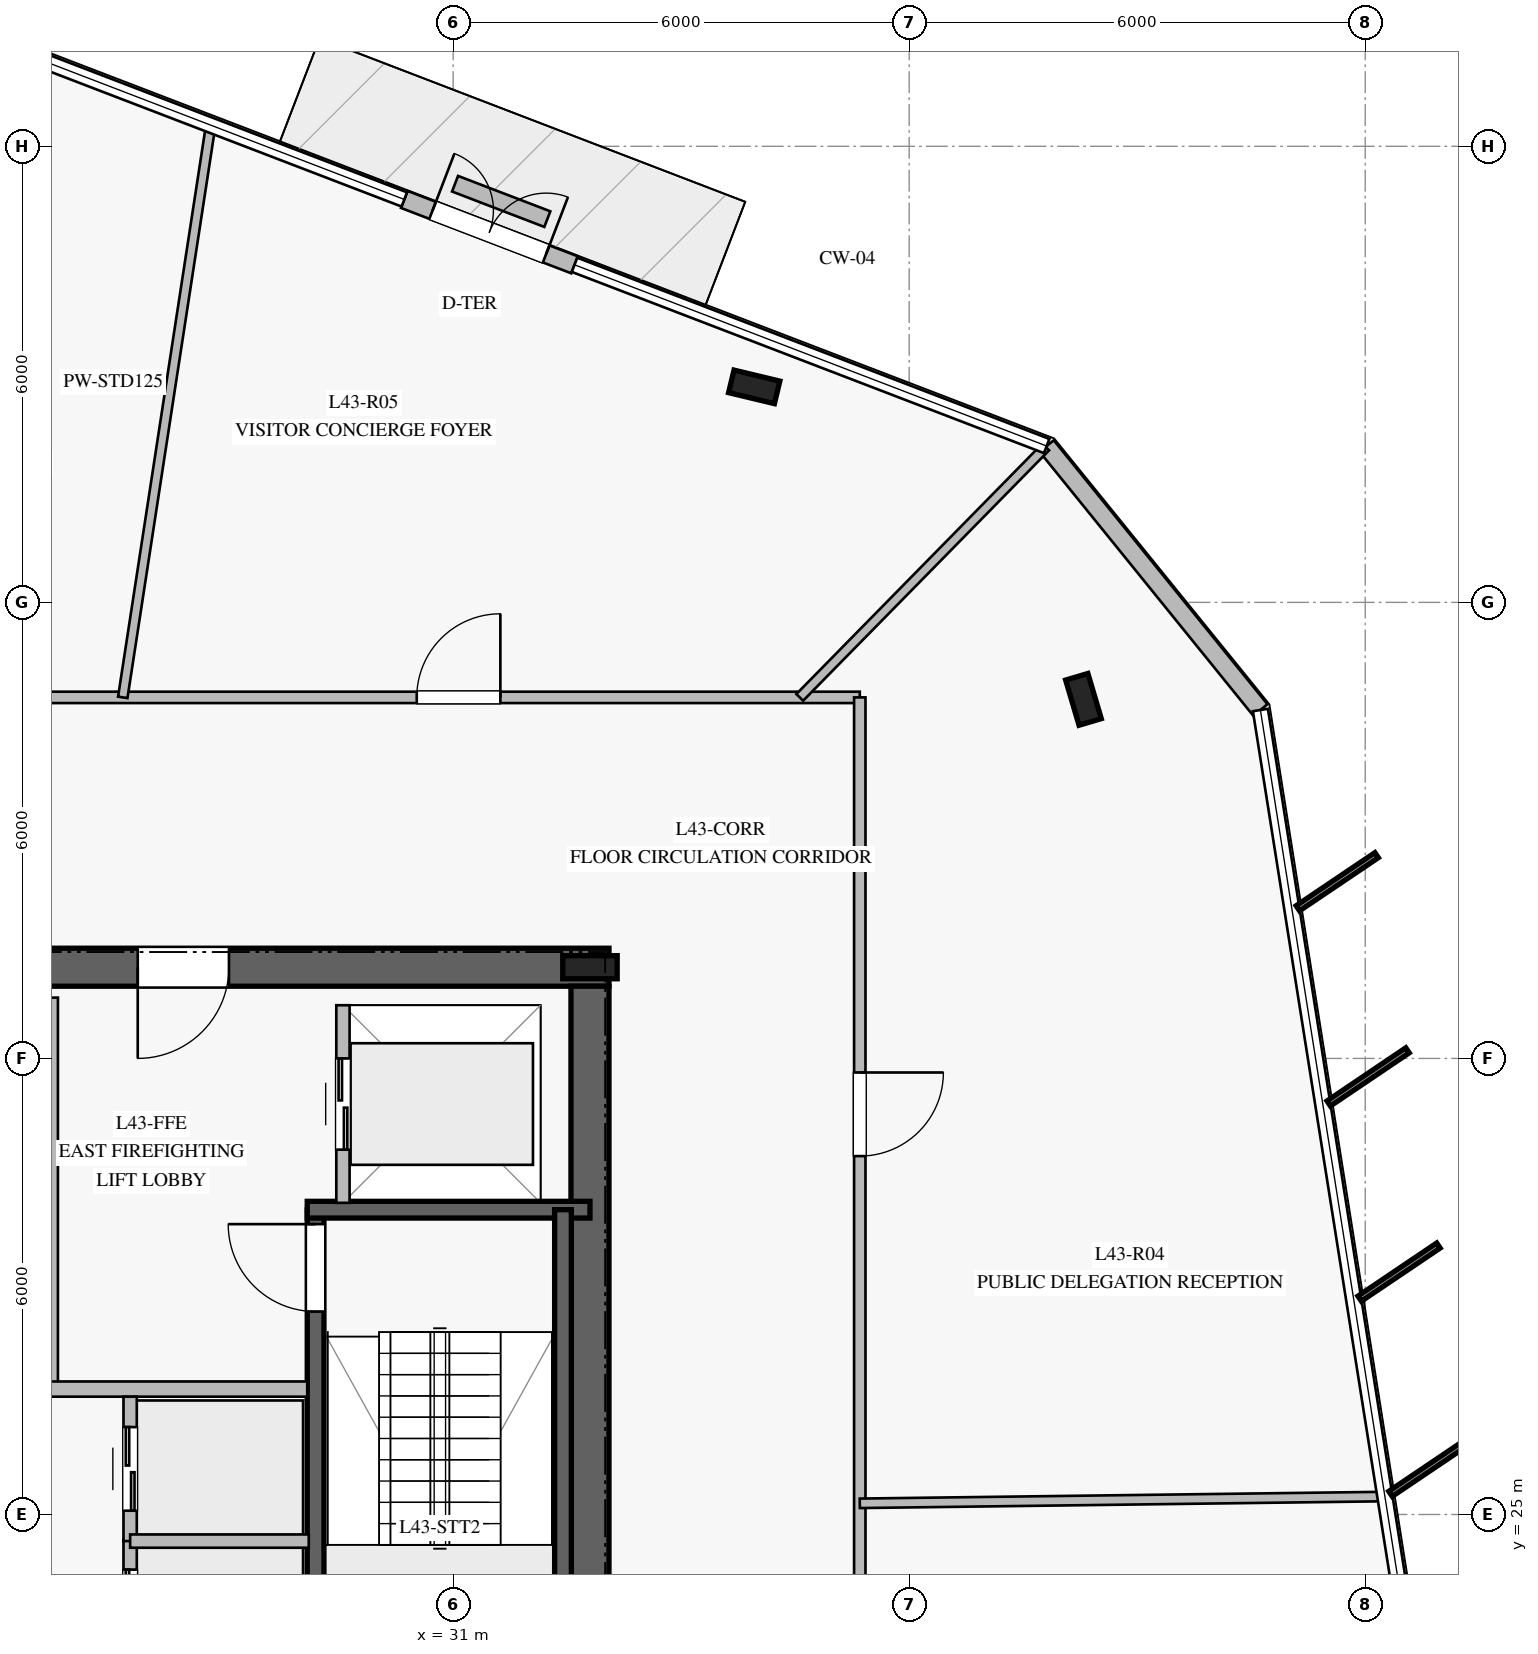
"""IFC4 building model, lengths in metres.
Left out: names, types, materials, properties, quantities, classifications, styles, units other than length and angle.
Written with IfcOpenShell. Run it as: python <this file> out.ifc"""

import sys

from ifc_helpers import new_model, si_unit, direction, frame, frame_2d, origin, origin_2d, place, context, subcontext, project, spatial, rectangle, i_section, extrude, element, fill, save


model = new_model("IFC4")
c1 = context("Model", 3, precision=1e-05, world=origin(), true_north=direction((0.0, 1.0)))
c2 = subcontext(c1, "Body", "Model", "MODEL_VIEW")
j1 = project(units=[si_unit("LENGTHUNIT", "METRE"), si_unit("PLANEANGLEUNIT", "RADIAN")], contexts=[c1])
p1 = place(None, origin())
s1 = spatial("IfcSite", under=j1, at=p1, CompositionType="ELEMENT")
p2 = place(p1, origin())
s2 = spatial("IfcBuilding", under=s1, at=p2, CompositionType="ELEMENT")
p3 = place(p2, frame((0.0, 0.0, 180.8)))
s3 = spatial("IfcBuildingStorey", under=s2, at=p3, CompositionType="ELEMENT", Elevation=180.8)
p4 = place(p3, frame((33.05, 32.2, 0.0), z_axis=(0.0, 0.0, 1.0), x_axis=(-1.0, 0.0, 0.0)))
e1 = element("IfcWall", 1, at=p4, inside=s3, PredefinedType="SHEAR", context=c2, shape_type="SweptSolid", body=[
    extrude(rectangle(XDim=16.1, YDim=0.5, at=frame_2d((8.05, 0.0))), origin(), (0.0, 0.0, 1.0), 3.78),
])
p5 = place(p4, frame((5.0, 0.0, 0.0)))
e2 = element("IfcOpeningElement", 2, at=p5, cuts=e1, PredefinedType="OPENING", context=c2, shape_type="SweptSolid", body=[
    extrude(rectangle(XDim=1.2, YDim=2.25, at=frame_2d((0.6, 1.125))), frame((0.0, 0.26, 0.0), z_axis=(0.0, -1.0, 0.0), x_axis=(1.0, 0.0, 0.0)), (0.0, 0.0, 1.0), 0.52),
])
p6 = place(p3, frame((32.8, 18.05, 0.0), z_axis=(0.0, 0.0, 1.0), x_axis=(0.0, 1.0, 0.0)))
e3 = element("IfcWall", 3, at=p6, inside=s3, PredefinedType="SHEAR", context=c2, shape_type="SweptSolid", body=[
    extrude(rectangle(XDim=13.9, YDim=0.5, at=frame_2d((6.95, 0.0))), origin(), (0.0, 0.0, 1.0), 3.78),
])
p7 = place(p3, frame((32.8, 32.2, 0.0), z_axis=(0.0, 0.0, 1.0), x_axis=(1.0, 0.0, 0.0)))
e4 = element("IfcColumn", 4, at=p7, inside=s3, PredefinedType="COLUMN", context=c2, shape_type="SweptSolid", body=[
    extrude(i_section(OverallWidth=0.304, OverallDepth=0.716, WebThickness=0.021, FlangeThickness=0.04, at=origin_2d()), origin(), (0.0, 0.0, 1.0), 4.0),
])
p8 = place(p3, frame((29.19, 21.79, 0.0), z_axis=(0.0, 0.0, 1.0), x_axis=(0.0, 1.0, 0.0)))
e5 = element("IfcWall", 5, at=p8, inside=s3, PredefinedType="SOLIDWALL", context=c2, shape_type="SweptSolid", body=[
    extrude(rectangle(XDim=7.22, YDim=0.22, at=frame_2d((3.61, 0.0))), origin(), (0.0, 0.0, 1.0), 3.78),
])
p9 = place(p8, frame((5.88, 0.0, 0.0)))
e6 = element("IfcOpeningElement", 6, at=p9, cuts=e5, PredefinedType="OPENING", context=c2, shape_type="SweptSolid", body=[
    extrude(rectangle(XDim=1.15, YDim=2.2, at=frame_2d((0.575, 1.1))), frame((0.0, 0.12, 0.0), z_axis=(0.0, -1.0, 0.0), x_axis=(1.0, 0.0, 0.0)), (0.0, 0.0, 1.0), 0.24),
])
p10 = place(p3, frame((29.08, 29.01, 0.0), z_axis=(0.0, 0.0, 1.0), x_axis=(1.0, 0.0, 0.0)))
e7 = element("IfcWall", 7, at=p10, inside=s3, PredefinedType="SOLIDWALL", context=c2, shape_type="SweptSolid", body=[
    extrude(rectangle(XDim=3.72, YDim=0.22, at=frame_2d((1.86, 0.0))), origin(), (0.0, 0.0, 1.0), 3.78),
])
p11 = place(p3, frame((32.445, 29.01, 0.0), z_axis=(0.0, 0.0, 1.0), x_axis=(0.0, -1.0, 0.0)))
e8 = element("IfcWall", 8, at=p11, inside=s3, PredefinedType="SOLIDWALL", context=c2, shape_type="SweptSolid", body=[
    extrude(rectangle(XDim=7.22, YDim=0.22, at=frame_2d((3.61, 0.0))), origin(), (0.0, 0.0, 1.0), 3.78),
])
for number, where, z_axis, x_axis in (
    (9, (34.961, 39.835, 0.0), (0.0, 0.0, 1.0), (-0.972, 0.233, 0.0)),
    (10, (39.293, 35.724, 0.0), (0.0, 0.0, 1.0), (-0.284, 0.959, 0.0)),
):
    element("IfcColumn", number, at=place(p3, frame(where, z_axis=z_axis, x_axis=x_axis)), inside=s3, PredefinedType="COLUMN", context=c2, shape_type="SweptSolid", body=[
        extrude(i_section(OverallWidth=0.305, OverallDepth=0.62, WebThickness=0.021, FlangeThickness=0.04, at=origin_2d()), origin(), (0.0, 0.0, 1.0), 4.0),
    ])
p12 = place(p3, frame((32.597, 41.441, 0.0), z_axis=(0.0, 0.0, 1.0), x_axis=(-0.933544764029, 0.358460839638, 0.0)))
e11 = element("IfcWall", 11, at=p12, inside=s3, PredefinedType="STANDARD", context=c2, shape_type="SweptSolid", body=[
    extrude(rectangle(XDim=2.399, YDim=0.24, at=frame_2d((1.2, 0.0))), origin(), (0.0, 0.0, 1.0), 3.78),
])
p13 = place(p12, frame((0.4, 0.0, 0.0)))
e12 = element("IfcOpeningElement", 12, at=p13, cuts=e11, PredefinedType="OPENING", context=c2, shape_type="SweptSolid", body=[
    extrude(rectangle(XDim=1.6, YDim=2.25, at=frame_2d((0.8, 1.125))), frame((0.0, 0.13, 0.0), z_axis=(0.0, -1.0, 0.0), x_axis=(1.0, 0.0, 0.0)), (0.0, 0.0, 1.0), 0.26),
])
p14 = place(p3, frame((41.621, 35.584, 0.0), z_axis=(0.0, 0.0, 1.0), x_axis=(-0.629281524136, 0.777177433654, 0.0)))
e13 = element("IfcWall", 13, at=p14, inside=s3, PredefinedType="STANDARD", context=c2, shape_type="SweptSolid", body=[
    extrude(rectangle(XDim=4.469, YDim=0.24, at=frame_2d((2.234, 0.0))), origin(), (0.0, 0.0, 1.0), 3.78),
])
p15 = place(p3, frame((32.239, 42.042, 0.0), z_axis=(0.0, 0.0, 1.0), x_axis=(-0.933577653273, 0.358375173959, 0.0)))
e14 = element("IfcWall", 14, at=p15, inside=s3, PredefinedType="USERDEFINED", context=c2, shape_type="SweptSolid", body=[
    extrude(rectangle(XDim=1.301, YDim=0.22, at=frame_2d((0.65, 0.0))), origin(), (0.0, 0.0, 1.0), 0.4),
])
p16 = place(p3, frame((25.7, 26.65, 0.0), z_axis=(0.0, 0.0, 1.0), x_axis=(0.0, 1.0, 0.0)))
e15 = element("IfcWall", 15, at=p16, inside=s3, PredefinedType="PARTITIONING", context=c2, shape_type="SweptSolid", body=[
    extrude(rectangle(XDim=5.15, YDim=0.2, at=frame_2d((2.575, 0.0))), origin(), (0.0, 0.0, 1.0), 3.78),
])
p17 = place(p3, frame((25.7, 26.65, 0.0), z_axis=(0.0, 0.0, 1.0), x_axis=(1.0, 0.0, 0.0)))
e16 = element("IfcWall", 16, at=p17, inside=s3, PredefinedType="PARTITIONING", context=c2, shape_type="SweptSolid", body=[
    extrude(rectangle(XDim=3.38, YDim=0.2, at=frame_2d((1.69, 0.0))), origin(), (0.0, 0.0, 1.0), 3.78),
])
p18 = place(p3, frame((26.75, 22.775, 0.0), z_axis=(0.0, 0.0, 1.0), x_axis=(0.0, 1.0, 0.0)))
e17 = element("IfcWall", 17, at=p18, inside=s3, PredefinedType="PARTITIONING", context=c2, shape_type="SweptSolid", body=[
    extrude(rectangle(XDim=1.9, YDim=0.175, at=frame_2d((0.95, 0.0))), origin(), (0.0, 0.0, 1.0), 3.78),
])
p19 = place(p18, frame((0.4, 0.0, 0.0)))
e18 = element("IfcOpeningElement", 18, at=p19, cuts=e17, PredefinedType="OPENING", context=c2, shape_type="SweptSolid", body=[
    extrude(rectangle(XDim=1.1, YDim=2.2, at=frame_2d((0.55, 1.1))), frame((0.0, 0.098, 0.0), z_axis=(0.0, -1.0, 0.0), x_axis=(1.0, 0.0, 0.0)), (0.0, 0.0, 1.0), 0.195),
])
p20 = place(p3, frame((26.75, 24.65, 0.0), z_axis=(0.0, 0.0, 1.0), x_axis=(0.0, 1.0, 0.0)))
e19 = element("IfcWall", 19, at=p20, inside=s3, PredefinedType="PARTITIONING", context=c2, shape_type="SweptSolid", body=[
    extrude(rectangle(XDim=1.9, YDim=0.175, at=frame_2d((0.95, 0.0))), origin(), (0.0, 0.0, 1.0), 3.78),
])
p21 = place(p20, frame((0.4, 0.0, 0.0)))
e20 = element("IfcOpeningElement", 20, at=p21, cuts=e19, PredefinedType="OPENING", context=c2, shape_type="SweptSolid", body=[
    extrude(rectangle(XDim=1.1, YDim=2.2, at=frame_2d((0.55, 1.1))), frame((0.0, 0.098, 0.0), z_axis=(0.0, -1.0, 0.0), x_axis=(1.0, 0.0, 0.0)), (0.0, 0.0, 1.0), 0.195),
])
p22 = place(p3, frame((26.75, 24.65, 0.0), z_axis=(0.0, 0.0, 1.0), x_axis=(1.0, 0.0, 0.0)))
e21 = element("IfcWall", 21, at=p22, inside=s3, PredefinedType="PARTITIONING", context=c2, shape_type="SweptSolid", body=[
    extrude(rectangle(XDim=2.35, YDim=0.175, at=frame_2d((1.175, 0.0))), origin(), (0.0, 0.0, 1.0), 3.78),
])
p23 = place(p3, frame((29.55, 29.1, 0.0), z_axis=(0.0, 0.0, 1.0), x_axis=(0.0, 1.0, 0.0)))
e22 = element("IfcWall", 22, at=p23, inside=s3, PredefinedType="PARTITIONING", context=c2, shape_type="SweptSolid", body=[
    extrude(rectangle(XDim=2.6, YDim=0.175, at=frame_2d((1.3, 0.0))), origin(), (0.0, 0.0, 1.0), 3.78),
])
p24 = place(p23, frame((0.7, 0.0, 0.0)))
e23 = element("IfcOpeningElement", 23, at=p24, cuts=e22, PredefinedType="OPENING", context=c2, shape_type="SweptSolid", body=[
    extrude(rectangle(XDim=1.2, YDim=2.2, at=frame_2d((0.6, 1.1))), frame((0.0, 0.098, 0.0), z_axis=(0.0, -1.0, 0.0), x_axis=(1.0, 0.0, 0.0)), (0.0, 0.0, 1.0), 0.195),
])
p25 = place(p3, frame((13.65, 35.75, 0.0), z_axis=(0.0, 0.0, 1.0), x_axis=(1.0, 0.0, 0.0)))
e24 = element("IfcWall", 24, at=p25, inside=s3, PredefinedType="PARTITIONING", context=c2, shape_type="SweptSolid", body=[
    extrude(rectangle(XDim=22.7, YDim=0.15, at=frame_2d((11.35, 0.0))), origin(), (0.0, 0.0, 1.0), 3.05),
])
p26 = place(p25, frame((16.871, 0.0, 0.0)))
e25 = element("IfcOpeningElement", 25, at=p26, cuts=e24, PredefinedType="OPENING", context=c2, shape_type="SweptSolid", body=[
    extrude(rectangle(XDim=1.1, YDim=2.2, at=frame_2d((0.55, 1.1))), frame((0.0, 0.085, 0.0), z_axis=(0.0, -1.0, 0.0), x_axis=(1.0, 0.0, 0.0)), (0.0, 0.0, 1.0), 0.17),
])
p27 = place(p25, frame((6.05, 0.0, 0.0)))
e26 = element("IfcOpeningElement", 26, at=p27, cuts=e24, PredefinedType="OPENING", context=c2, shape_type="SweptSolid", body=[
    extrude(rectangle(XDim=1.1, YDim=2.2, at=frame_2d((0.55, 1.1))), frame((0.0, 0.085, 0.0), z_axis=(0.0, -1.0, 0.0), x_axis=(1.0, 0.0, 0.0)), (0.0, 0.0, 1.0), 0.17),
])
p28 = place(p3, frame((36.35, 35.75, 0.0), z_axis=(0.0, 0.0, 1.0), x_axis=(0.0, -1.0, 0.0)))
e27 = element("IfcWall", 27, at=p28, inside=s3, PredefinedType="PARTITIONING", context=c2, shape_type="SweptSolid", body=[
    extrude(rectangle(XDim=21.5, YDim=0.15, at=frame_2d((10.75, 0.0))), origin(), (0.0, 0.0, 1.0), 3.28),
])
p29 = place(p28, frame((15.228, 0.0, 0.0)))
e28 = element("IfcOpeningElement", 28, at=p29, cuts=e27, PredefinedType="OPENING", context=c2, shape_type="SweptSolid", body=[
    extrude(rectangle(XDim=1.1, YDim=2.2, at=frame_2d((0.55, 1.1))), frame((0.0, 0.085, 0.0), z_axis=(0.0, -1.0, 0.0), x_axis=(1.0, 0.0, 0.0)), (0.0, 0.0, 1.0), 0.17),
])
p30 = place(p28, frame((4.935, 0.0, 0.0)))
e29 = element("IfcOpeningElement", 29, at=p30, cuts=e27, PredefinedType="OPENING", context=c2, shape_type="SweptSolid", body=[
    extrude(rectangle(XDim=1.1, YDim=2.2, at=frame_2d((0.55, 1.1))), frame((0.0, 0.085, 0.0), z_axis=(0.0, -1.0, 0.0), x_axis=(1.0, 0.0, 0.0)), (0.0, 0.0, 1.0), 0.17),
])
p31 = place(p3, frame((26.653, 35.75, 0.0), z_axis=(0.0, 0.0, 1.0), x_axis=(0.151972699026, 0.988384691682, 0.0)))
e30 = element("IfcWall", 30, at=p31, inside=s3, PredefinedType="PARTITIONING", context=c2, shape_type="SweptSolid", body=[
    extrude(rectangle(XDim=7.6, YDim=0.125, at=frame_2d((3.8, 0.0))), origin(), (0.0, 0.0, 1.0), 3.05),
])
p32 = place(p3, frame((36.35, 25.147, 0.0), z_axis=(0.0, 0.0, 1.0), x_axis=(0.999916442153, 0.012927053497, 0.0)))
e31 = element("IfcWall", 31, at=p32, inside=s3, PredefinedType="PARTITIONING", context=c2, shape_type="SweptSolid", body=[
    extrude(rectangle(XDim=6.893, YDim=0.125, at=frame_2d((3.447, 0.0))), origin(), (0.0, 0.0, 1.0), 3.18),
])
p33 = place(p3, frame((35.56, 35.75, 0.0), z_axis=(0.0, 0.0, 1.0), x_axis=(0.700786827559, 0.71337074675, 0.0)))
e32 = element("IfcWall", 32, at=p33, inside=s3, PredefinedType="PARTITIONING", context=c2, shape_type="SweptSolid", body=[
    extrude(rectangle(XDim=4.617, YDim=0.125, at=frame_2d((2.309, 0.0))), origin(), (0.0, 0.0, 1.0), 3.18),
])
p34 = place(p13, frame((1.6, 0.0, 0.0), z_axis=(0.0, 0.0, 1.0), x_axis=(-1.0, 0.0, 0.0)))
e33 = element("IfcDoor", 33, at=p34, inside=s3, OperationType="DOUBLE_DOOR_SINGLE_SWING", PredefinedType="DOOR", context=c2, shape_type="SweptSolid", body=[
    extrude(rectangle(XDim=1.6, YDim=2.25, at=frame_2d((0.8, 1.125))), frame((0.0, 0.025, 0.0), z_axis=(0.0, -1.0, 0.0), x_axis=(1.0, 0.0, 0.0)), (0.0, 0.0, 1.0), 0.05),
])
fill(e12, e33)
p35 = place(p9, origin())
e34 = element("IfcDoor", 34, at=p35, inside=s3, OperationType="SINGLE_SWING_RIGHT", PredefinedType="DOOR", context=c2, shape_type="SweptSolid", body=[
    extrude(rectangle(XDim=1.15, YDim=2.2, at=frame_2d((0.575, 1.1))), frame((0.0, 0.025, 0.0), z_axis=(0.0, -1.0, 0.0), x_axis=(1.0, 0.0, 0.0)), (0.0, 0.0, 1.0), 0.05),
])
fill(e6, e34)
p36 = place(p5, origin())
e35 = element("IfcDoor", 35, at=p36, inside=s3, OperationType="SINGLE_SWING_RIGHT", PredefinedType="DOOR", context=c2, shape_type="SweptSolid", body=[
    extrude(rectangle(XDim=1.2, YDim=2.25, at=frame_2d((0.6, 1.125))), frame((0.0, 0.025, 0.0), z_axis=(0.0, -1.0, 0.0), x_axis=(1.0, 0.0, 0.0)), (0.0, 0.0, 1.0), 0.05),
])
fill(e2, e35)
p37 = place(p19, origin())
e36 = element("IfcDoor", 36, at=p37, inside=s3, OperationType="DOUBLE_DOOR_SLIDING", PredefinedType="DOOR", context=c2, shape_type="SweptSolid", body=[
    extrude(rectangle(XDim=1.1, YDim=2.2, at=frame_2d((0.55, 1.1))), frame((0.0, 0.025, 0.0), z_axis=(0.0, -1.0, 0.0), x_axis=(1.0, 0.0, 0.0)), (0.0, 0.0, 1.0), 0.05),
])
fill(e18, e36)
p38 = place(p21, origin())
e37 = element("IfcDoor", 37, at=p38, inside=s3, OperationType="DOUBLE_DOOR_SLIDING", PredefinedType="DOOR", context=c2, shape_type="SweptSolid", body=[
    extrude(rectangle(XDim=1.1, YDim=2.2, at=frame_2d((0.55, 1.1))), frame((0.0, 0.025, 0.0), z_axis=(0.0, -1.0, 0.0), x_axis=(1.0, 0.0, 0.0)), (0.0, 0.0, 1.0), 0.05),
])
fill(e20, e37)
p39 = place(p24, origin())
e38 = element("IfcDoor", 38, at=p39, inside=s3, OperationType="DOUBLE_DOOR_SLIDING", PredefinedType="DOOR", context=c2, shape_type="SweptSolid", body=[
    extrude(rectangle(XDim=1.2, YDim=2.2, at=frame_2d((0.6, 1.1))), frame((0.0, 0.025, 0.0), z_axis=(0.0, -1.0, 0.0), x_axis=(1.0, 0.0, 0.0)), (0.0, 0.0, 1.0), 0.05),
])
fill(e23, e38)
p40 = place(p30, origin())
e39 = element("IfcDoor", 39, at=p40, inside=s3, OperationType="SINGLE_SWING_LEFT", PredefinedType="DOOR", context=c2, shape_type="SweptSolid", body=[
    extrude(rectangle(XDim=1.1, YDim=2.2, at=frame_2d((0.55, 1.1))), frame((0.0, 0.025, 0.0), z_axis=(0.0, -1.0, 0.0), x_axis=(1.0, 0.0, 0.0)), (0.0, 0.0, 1.0), 0.05),
])
fill(e29, e39)
p41 = place(p26, origin())
e40 = element("IfcDoor", 40, at=p41, inside=s3, OperationType="SINGLE_SWING_RIGHT", PredefinedType="DOOR", context=c2, shape_type="SweptSolid", body=[
    extrude(rectangle(XDim=1.1, YDim=2.2, at=frame_2d((0.55, 1.1))), frame((0.0, 0.025, 0.0), z_axis=(0.0, -1.0, 0.0), x_axis=(1.0, 0.0, 0.0)), (0.0, 0.0, 1.0), 0.05),
])
fill(e25, e40)
save(model, sys.argv[1])
